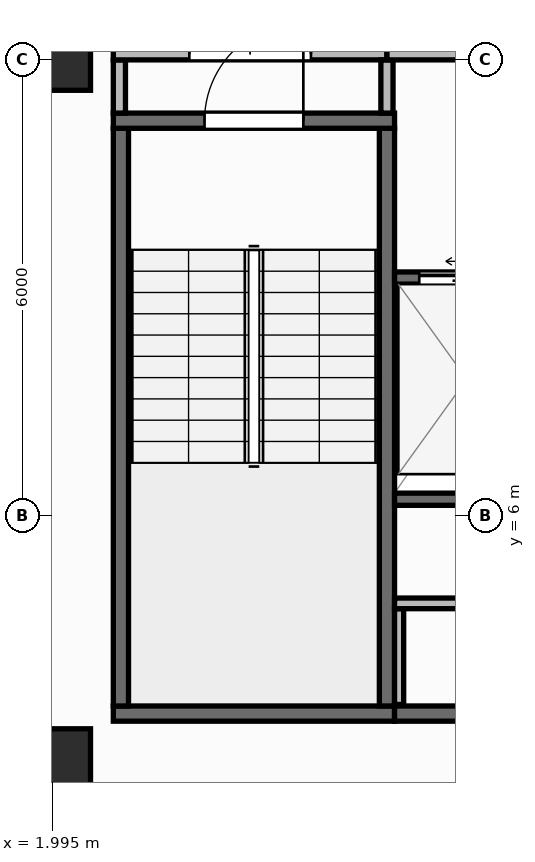
"""IFC4 building model, lengths in metres.
Left out: names, types, materials, properties, quantities, classifications, styles, units other than length and angle.
Written with IfcOpenShell. Run it as: python <this file> out.ifc"""

import sys

from ifc_helpers import new_model, si_unit, direction, frame, frame_2d, origin, origin_2d, place, context, subcontext, project, spatial, rectangle, extrude, element, fill, save


model = new_model("IFC4")
c1 = context("Model", 3, precision=1e-05, world=origin(), true_north=direction((0.0, 1.0)))
c2 = subcontext(c1, "Body", "Model", "MODEL_VIEW")
j1 = project(units=[si_unit("LENGTHUNIT", "METRE"), si_unit("PLANEANGLEUNIT", "RADIAN")], contexts=[c1])
p1 = place(None, origin())
s1 = spatial("IfcSite", under=j1, at=p1, CompositionType="ELEMENT")
p2 = place(p1, origin())
s2 = spatial("IfcBuilding", under=s1, at=p2, CompositionType="ELEMENT")
p3 = place(p2, frame((0.0, 0.0, 280.25)))
s3 = spatial("IfcBuildingStorey", under=s2, at=p3, CompositionType="ELEMENT", Elevation=280.25)
for number, where, z_axis, x_axis in (
    (1, (2.1, 2.8, 0.0), (0.0, 0.0, 1.0), (1.0, 0.0, 0.0)),
    (2, (2.1, 12.0, 0.0), (0.0, 0.0, 1.0), (1.0, 0.0, 0.0)),
):
    element("IfcColumn", number, at=place(p3, frame(where, z_axis=z_axis, x_axis=x_axis)), inside=s3, PredefinedType="COLUMN", context=c2, shape_type="SweptSolid", body=[
        extrude(rectangle(XDim=0.8, YDim=0.8, at=origin_2d()), origin(), (0.0, 0.0, 1.0), 3.95),
    ])
p4 = place(p3, frame((2.46, 0.172, 0.0), z_axis=(0.0, 0.0, 1.0), x_axis=(0.997289775118, 0.073573802713, 0.0)))
e3 = element("IfcWall", 3, at=p4, inside=s3, PredefinedType="STANDARD", context=c2, shape_type="SweptSolid", body=[
    extrude(rectangle(XDim=36.379, YDim=0.26, at=frame_2d((18.189, 0.0))), origin(), (0.0, 0.0, 1.0), 3.71),
])
p5 = place(p4, frame((16.989, 0.0, 0.9)))
e4 = element("IfcOpeningElement", 4, at=p5, cuts=e3, PredefinedType="OPENING", context=c2, shape_type="SweptSolid", body=[
    extrude(rectangle(XDim=2.4, YDim=1.65, at=frame_2d((1.2, 0.825))), frame((0.0, 0.14, 0.0), z_axis=(0.0, -1.0, 0.0), x_axis=(1.0, 0.0, 0.0)), (0.0, 0.0, 1.0), 0.28),
])
p6 = place(p3, frame((2.8, 3.4, 0.0), z_axis=(0.0, 0.0, 1.0), x_axis=(1.0, 0.0, 0.0)))
e5 = element("IfcWall", 5, at=p6, inside=s3, PredefinedType="SHEAR", context=c2, shape_type="SweptSolid", body=[
    extrude(rectangle(XDim=3.7, YDim=0.2, at=frame_2d((1.85, 0.0))), origin(), (0.0, 0.0, 1.0), 3.71),
])
for number, where, z_axis, x_axis in (
    (6, (2.9, 3.5, 0.0), (0.0, 0.0, 1.0), (0.0, 1.0, 0.0)),
    (7, (6.4, 3.5, 0.0), (0.0, 0.0, 1.0), (0.0, 1.0, 0.0)),
):
    element("IfcWall", number, at=place(p3, frame(where, z_axis=z_axis, x_axis=x_axis)), inside=s3, PredefinedType="SHEAR", context=c2, shape_type="SweptSolid", body=[
        extrude(rectangle(XDim=7.6, YDim=0.2, at=frame_2d((3.8, 0.0))), origin(), (0.0, 0.0, 1.0), 3.71),
    ])
p7 = place(p3, frame((2.8, 11.2, 0.0), z_axis=(0.0, 0.0, 1.0), x_axis=(1.0, 0.0, 0.0)))
e8 = element("IfcWall", 8, at=p7, inside=s3, PredefinedType="SHEAR", context=c2, shape_type="SweptSolid", body=[
    extrude(rectangle(XDim=3.7, YDim=0.2, at=frame_2d((1.85, 0.0))), origin(), (0.0, 0.0, 1.0), 3.71),
])
p8 = place(p7, frame((1.2, 0.0, 0.0)))
e9 = element("IfcOpeningElement", 9, at=p8, cuts=e8, PredefinedType="OPENING", context=c2, shape_type="SweptSolid", body=[
    extrude(rectangle(XDim=1.3, YDim=2.15, at=frame_2d((0.65, 1.075))), frame((0.0, 0.11, 0.0), z_axis=(0.0, -1.0, 0.0), x_axis=(1.0, 0.0, 0.0)), (0.0, 0.0, 1.0), 0.22),
])
p9 = place(p3, frame((6.5, 3.4, 0.0), z_axis=(0.0, 0.0, 1.0), x_axis=(1.0, 0.0, 0.0)))
e10 = element("IfcWall", 10, at=p9, inside=s3, PredefinedType="SHEAR", context=c2, shape_type="SweptSolid", body=[
    extrude(rectangle(XDim=13.7, YDim=0.2, at=frame_2d((6.85, 0.0))), origin(), (0.0, 0.0, 1.0), 3.71),
])
p10 = place(p3, frame((6.5, 6.22, 0.0), z_axis=(0.0, 0.0, 1.0), x_axis=(1.0, 0.0, 0.0)))
e11 = element("IfcWall", 11, at=p10, inside=s3, PredefinedType="SHEAR", context=c2, shape_type="SweptSolid", body=[
    extrude(rectangle(XDim=12.11, YDim=0.16, at=frame_2d((6.055, 0.0))), origin(), (0.0, 0.0, 1.0), 3.71),
])
p11 = place(p3, frame((6.5, 9.13, 0.0), z_axis=(0.0, 0.0, 1.0), x_axis=(1.0, 0.0, 0.0)))
e12 = element("IfcWall", 12, at=p11, inside=s3, PredefinedType="SHEAR", context=c2, shape_type="SweptSolid", body=[
    extrude(rectangle(XDim=1.975, YDim=0.16, at=frame_2d((0.988, 0.0))), origin(), (0.0, 0.0, 1.0), 3.71),
])
p12 = place(p11, frame((0.325, 0.0, 0.0)))
e13 = element("IfcOpeningElement", 13, at=p12, cuts=e12, PredefinedType="OPENING", context=c2, shape_type="SweptSolid", body=[
    extrude(rectangle(XDim=1.25, YDim=2.15, at=frame_2d((0.625, 1.075))), frame((0.0, 0.09, 0.0), z_axis=(0.0, -1.0, 0.0), x_axis=(1.0, 0.0, 0.0)), (0.0, 0.0, 1.0), 0.18),
])
p13 = place(p3, frame((6.56, 3.52, 0.0), z_axis=(0.0, 0.0, 1.0), x_axis=(0.0, 1.0, 0.0)))
e14 = element("IfcWall", 14, at=p13, inside=s3, PredefinedType="PARTITIONING", context=c2, shape_type="SweptSolid", body=[
    extrude(rectangle(XDim=1.26, YDim=0.12, at=frame_2d((0.63, 0.0))), origin(), (0.0, 0.0, 1.0), 3.71),
])
p14 = place(p3, frame((6.5, 4.85, 0.0), z_axis=(0.0, 0.0, 1.0), x_axis=(1.0, 0.0, 0.0)))
e15 = element("IfcWall", 15, at=p14, inside=s3, PredefinedType="PARTITIONING", context=c2, shape_type="SweptSolid", body=[
    extrude(rectangle(XDim=5.67, YDim=0.14, at=frame_2d((2.835, 0.0))), origin(), (0.0, 0.0, 1.0), 3.71),
])
p15 = place(p14, frame((2.285, 0.0, 0.0)))
e16 = element("IfcOpeningElement", 16, at=p15, cuts=e15, PredefinedType="OPENING", context=c2, shape_type="SweptSolid", body=[
    extrude(rectangle(XDim=1.1, YDim=2.1, at=frame_2d((0.55, 1.05))), frame((0.0, 0.08, 0.0), z_axis=(0.0, -1.0, 0.0), x_axis=(1.0, 0.0, 0.0)), (0.0, 0.0, 1.0), 0.16),
])
p16 = place(p3, frame((2.88, 11.3, 0.0), z_axis=(0.0, 0.0, 1.0), x_axis=(0.0, 1.0, 0.0)))
e17 = element("IfcWall", 17, at=p16, inside=s3, PredefinedType="PARTITIONING", context=c2, shape_type="SweptSolid", body=[
    extrude(rectangle(XDim=0.7, YDim=0.16, at=frame_2d((0.35, 0.0))), origin(), (0.0, 0.0, 1.0), 3.71),
])
p17 = place(p3, frame((2.8, 12.08, 0.0), z_axis=(0.0, 0.0, 1.0), x_axis=(1.0, 0.0, 0.0)))
e18 = element("IfcWall", 18, at=p17, inside=s3, PredefinedType="PARTITIONING", context=c2, shape_type="SweptSolid", body=[
    extrude(rectangle(XDim=3.6, YDim=0.16, at=frame_2d((1.8, 0.0))), origin(), (0.0, 0.0, 1.0), 3.157),
])
p18 = place(p17, frame((1.0, 0.0, 0.0)))
e19 = element("IfcOpeningElement", 19, at=p18, cuts=e18, PredefinedType="OPENING", context=c2, shape_type="SweptSolid", body=[
    extrude(rectangle(XDim=1.6, YDim=2.05, at=frame_2d((0.8, 1.025))), frame((0.0, 0.09, 0.0), z_axis=(0.0, -1.0, 0.0), x_axis=(1.0, 0.0, 0.0)), (0.0, 0.0, 1.0), 0.18),
])
p19 = place(p3, frame((6.4, 11.3, 0.0), z_axis=(0.0, 0.0, 1.0), x_axis=(0.0, 1.0, 0.0)))
e20 = element("IfcWall", 20, at=p19, inside=s3, PredefinedType="PARTITIONING", context=c2, shape_type="SweptSolid", body=[
    extrude(rectangle(XDim=0.7, YDim=0.16, at=frame_2d((0.35, 0.0))), origin(), (0.0, 0.0, 1.0), 3.71),
])
p20 = place(p3, frame((6.4, 12.08, 0.0), z_axis=(0.0, 0.0, 1.0), x_axis=(1.0, 0.0, 0.0)))
e21 = element("IfcWall", 21, at=p20, inside=s3, PredefinedType="PARTITIONING", context=c2, shape_type="SweptSolid", body=[
    extrude(rectangle(XDim=6.18, YDim=0.16, at=frame_2d((3.09, 0.0))), origin(), (0.0, 0.0, 1.0), 3.157),
])
p21 = place(p20, frame((2.29, 0.0, 0.0)))
e22 = element("IfcOpeningElement", 22, at=p21, cuts=e21, PredefinedType="OPENING", context=c2, shape_type="SweptSolid", body=[
    extrude(rectangle(XDim=1.6, YDim=2.05, at=frame_2d((0.8, 1.025))), frame((0.0, 0.09, 0.0), z_axis=(0.0, -1.0, 0.0), x_axis=(1.0, 0.0, 0.0)), (0.0, 0.0, 1.0), 0.18),
])
p22 = place(p8, origin())
e23 = element("IfcDoor", 23, at=p22, inside=s3, OperationType="SINGLE_SWING_RIGHT", PredefinedType="DOOR", context=c2, shape_type="SweptSolid", body=[
    extrude(rectangle(XDim=1.3, YDim=2.15, at=frame_2d((0.65, 1.075))), frame((0.0, 0.025, 0.0), z_axis=(0.0, -1.0, 0.0), x_axis=(1.0, 0.0, 0.0)), (0.0, 0.0, 1.0), 0.05),
])
fill(e9, e23)
p23 = place(p12, origin())
e24 = element("IfcDoor", 24, at=p23, inside=s3, OperationType="SLIDING_TO_LEFT", PredefinedType="DOOR", context=c2, shape_type="SweptSolid", body=[
    extrude(rectangle(XDim=1.25, YDim=2.15, at=frame_2d((0.625, 1.075))), frame((0.0, 0.025, 0.0), z_axis=(0.0, -1.0, 0.0), x_axis=(1.0, 0.0, 0.0)), (0.0, 0.0, 1.0), 0.05),
])
fill(e13, e24)
p24 = place(p18, origin())
e25 = element("IfcDoor", 25, at=p24, inside=s3, OperationType="DOUBLE_DOOR_SINGLE_SWING", PredefinedType="DOOR", context=c2, shape_type="SweptSolid", body=[
    extrude(rectangle(XDim=1.6, YDim=2.05, at=frame_2d((0.8, 1.025))), frame((0.0, 0.025, 0.0), z_axis=(0.0, -1.0, 0.0), x_axis=(1.0, 0.0, 0.0)), (0.0, 0.0, 1.0), 0.05),
])
fill(e19, e25)
save(model, sys.argv[1])
